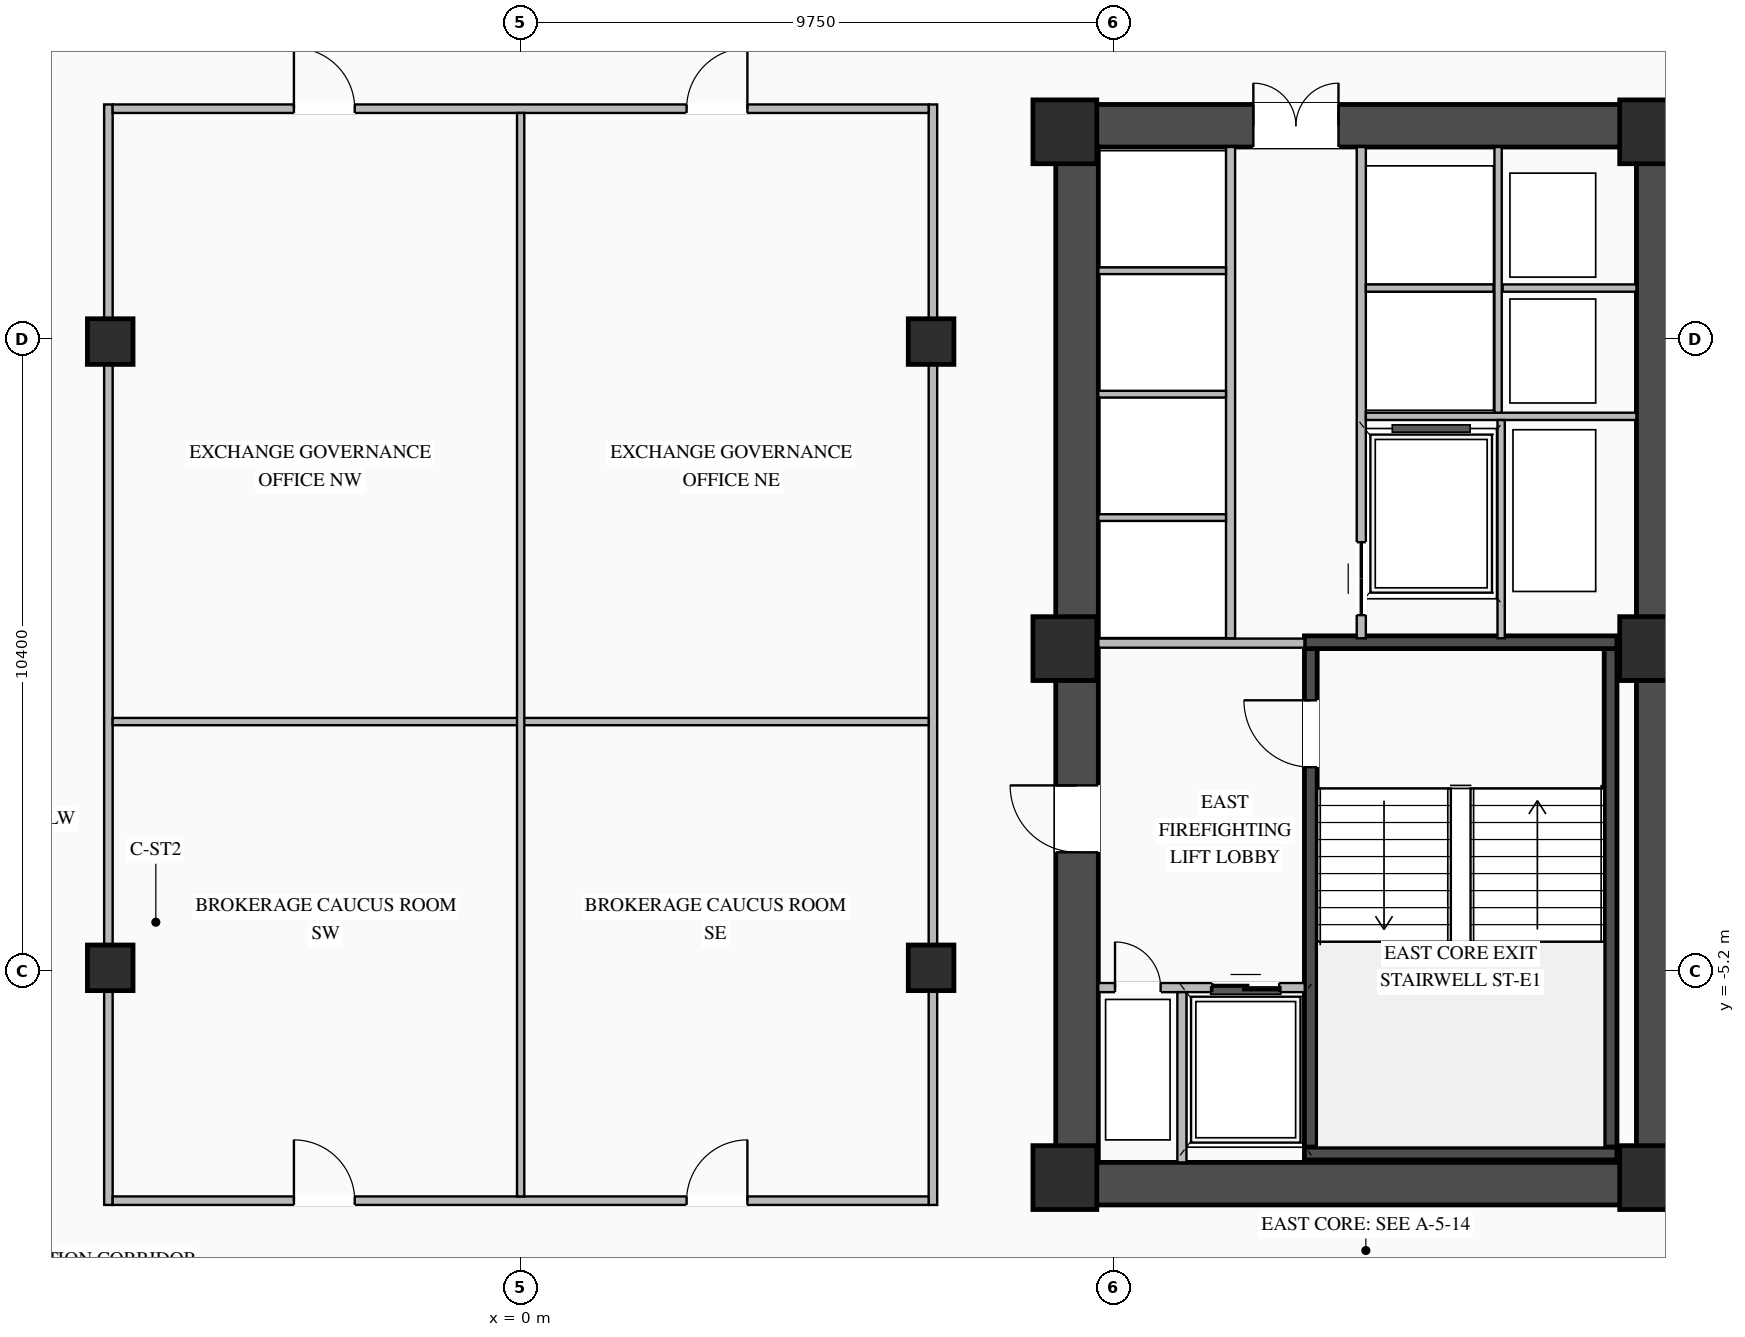
"""IFC4 building model, lengths in metres.
Left out: names, types, materials, properties, quantities, classifications, styles, units other than length and angle.
Written with IfcOpenShell. Run it as: python <this file> out.ifc"""

import sys

from ifc_helpers import new_model, si_unit, direction, frame, frame_2d, origin, origin_2d, place, context, subcontext, project, spatial, rectangle, i_section, extrude, element, fill, save


model = new_model("IFC4")
c1 = context("Model", 3, precision=1e-05, world=origin(), true_north=direction((0.0, 1.0)))
c2 = subcontext(c1, "Body", "Model", "MODEL_VIEW")
j1 = project(units=[si_unit("LENGTHUNIT", "METRE"), si_unit("PLANEANGLEUNIT", "RADIAN")], contexts=[c1])
p1 = place(None, origin())
s1 = spatial("IfcSite", under=j1, at=p1, CompositionType="ELEMENT")
p2 = place(p1, origin())
s2 = spatial("IfcBuilding", under=s1, at=p2, CompositionType="ELEMENT")
p3 = place(p2, frame((0.0, 0.0, 101.8)))
s3 = spatial("IfcBuildingStorey", under=s2, at=p3, CompositionType="ELEMENT", Elevation=101.8)
p4 = place(p3, frame((8.8, -8.7, 0.0), z_axis=(0.0, 0.0, 1.0), x_axis=(1.0, 0.0, 0.0)))
e1 = element("IfcWall", 1, at=p4, inside=s3, PredefinedType="SHEAR", context=c2, shape_type="SweptSolid", body=[
    extrude(rectangle(XDim=10.25, YDim=0.7, at=frame_2d((5.125, 0.0))), origin(), (0.0, 0.0, 1.0), 3.27),
])
p5 = place(p3, frame((8.8, 8.7, 0.0), z_axis=(0.0, 0.0, 1.0), x_axis=(1.0, 0.0, 0.0)))
e2 = element("IfcWall", 2, at=p5, inside=s3, PredefinedType="SHEAR", context=c2, shape_type="SweptSolid", body=[
    extrude(rectangle(XDim=10.25, YDim=0.7, at=frame_2d((5.125, 0.0))), origin(), (0.0, 0.0, 1.0), 3.27),
])
p6 = place(p5, frame((3.25, 0.0, 0.0)))
e3 = element("IfcOpeningElement", 3, at=p6, cuts=e2, PredefinedType="OPENING", context=c2, shape_type="SweptSolid", body=[
    extrude(rectangle(XDim=1.4, YDim=2.05, at=frame_2d((0.7, 1.025))), frame((0.0, 0.36, 0.0), z_axis=(0.0, -1.0, 0.0), x_axis=(1.0, 0.0, 0.0)), (0.0, 0.0, 1.0), 0.72),
])
p7 = place(p3, frame((9.15, -8.35, 0.0), z_axis=(0.0, 0.0, 1.0), x_axis=(0.0, 1.0, 0.0)))
e4 = element("IfcWall", 4, at=p7, inside=s3, PredefinedType="SHEAR", context=c2, shape_type="SweptSolid", body=[
    extrude(rectangle(XDim=16.7, YDim=0.7, at=frame_2d((8.35, 0.0))), origin(), (0.0, 0.0, 1.0), 3.27),
])
p8 = place(p7, frame((5.1, 0.0, 0.0)))
e5 = element("IfcOpeningElement", 5, at=p8, cuts=e4, PredefinedType="OPENING", context=c2, shape_type="SweptSolid", body=[
    extrude(rectangle(XDim=1.1, YDim=2.08, at=frame_2d((0.55, 1.04))), frame((0.0, 0.36, 0.0), z_axis=(0.0, -1.0, 0.0), x_axis=(1.0, 0.0, 0.0)), (0.0, 0.0, 1.0), 0.72),
])
p9 = place(p3, frame((18.7, -8.35, 0.0), z_axis=(0.0, 0.0, 1.0), x_axis=(0.0, 1.0, 0.0)))
e6 = element("IfcWall", 6, at=p9, inside=s3, PredefinedType="SHEAR", context=c2, shape_type="SweptSolid", body=[
    extrude(rectangle(XDim=16.7, YDim=0.7, at=frame_2d((8.35, 0.0))), origin(), (0.0, 0.0, 1.0), 3.27),
])
p10 = place(p3, frame((12.995, -8.1, 0.0), z_axis=(0.0, 0.0, 1.0), x_axis=(0.0, 1.0, 0.0)))
e7 = element("IfcWall", 7, at=p10, inside=s3, PredefinedType="SHEAR", context=c2, shape_type="SweptSolid", body=[
    extrude(rectangle(XDim=8.2, YDim=0.21, at=frame_2d((4.1, 0.0))), origin(), (0.0, 0.0, 1.0), 3.27),
])
p11 = place(p10, frame((6.25, 0.0, 0.0)))
e8 = element("IfcOpeningElement", 8, at=p11, cuts=e7, PredefinedType="OPENING", context=c2, shape_type="SweptSolid", body=[
    extrude(rectangle(XDim=1.1, YDim=2.15, at=frame_2d((0.55, 1.075))), frame((0.0, 0.115, 0.0), z_axis=(0.0, -1.0, 0.0), x_axis=(1.0, 0.0, 0.0)), (0.0, 0.0, 1.0), 0.23),
])
p12 = place(p3, frame((17.925, -8.1, 0.0), z_axis=(0.0, 0.0, 1.0), x_axis=(0.0, 1.0, 0.0)))
e9 = element("IfcWall", 9, at=p12, inside=s3, PredefinedType="SHEAR", context=c2, shape_type="SweptSolid", body=[
    extrude(rectangle(XDim=8.2, YDim=0.21, at=frame_2d((4.1, 0.0))), origin(), (0.0, 0.0, 1.0), 3.27),
])
for number, where, z_axis, x_axis in (
    (10, (12.89, -8.205, 0.0), (0.0, 0.0, 1.0), (1.0, 0.0, 0.0)),
    (11, (18.03, 0.205, 0.0), (0.0, 0.0, 1.0), (-1.0, 0.0, 0.0)),
):
    element("IfcWall", number, at=place(p3, frame(where, z_axis=z_axis, x_axis=x_axis)), inside=s3, PredefinedType="SHEAR", context=c2, shape_type="SweptSolid", body=[
        extrude(rectangle(XDim=5.14, YDim=0.21, at=frame_2d((2.57, 0.0))), origin(), (0.0, 0.0, 1.0), 3.27),
    ])
for number, where, z_axis, x_axis in (
    (12, (8.95, -8.6, 0.0), (0.0, 0.0, 1.0), (1.0, 0.0, 0.0)),
    (13, (8.95, 0.1, 0.0), (0.0, 0.0, 1.0), (1.0, 0.0, 0.0)),
    (14, (8.95, 8.6, 0.0), (0.0, 0.0, 1.0), (1.0, 0.0, 0.0)),
    (15, (18.6, -8.6, 0.0), (0.0, 0.0, 1.0), (1.0, 0.0, 0.0)),
    (16, (18.6, 0.1, 0.0), (0.0, 0.0, 1.0), (1.0, 0.0, 0.0)),
    (17, (18.6, 8.6, 0.0), (0.0, 0.0, 1.0), (1.0, 0.0, 0.0)),
):
    element("IfcColumn", number, at=place(p3, frame(where, z_axis=z_axis, x_axis=x_axis)), inside=s3, PredefinedType="COLUMN", context=c2, shape_type="SweptSolid", body=[
        extrude(rectangle(XDim=1.05, YDim=1.05, at=origin_2d()), origin(), (0.0, 0.0, 1.0), 3.45),
    ])
for number, where, z_axis, x_axis in (
    (18, (-6.75, -5.15, 0.0), (0.0, 0.0, 1.0), (1.0, 0.0, 0.0)),
    (19, (-6.75, 5.15, 0.0), (0.0, 0.0, 1.0), (1.0, 0.0, 0.0)),
    (20, (6.75, -5.15, 0.0), (0.0, 0.0, 1.0), (1.0, 0.0, 0.0)),
    (21, (6.75, 5.15, 0.0), (0.0, 0.0, 1.0), (1.0, 0.0, 0.0)),
):
    element("IfcColumn", number, at=place(p3, frame(where, z_axis=z_axis, x_axis=x_axis)), inside=s3, PredefinedType="COLUMN", context=c2, shape_type="SweptSolid", body=[
        extrude(i_section(OverallWidth=0.75, OverallDepth=0.75, WebThickness=0.03, FlangeThickness=0.044, at=origin_2d()), origin(), (0.0, 0.0, 1.0), 3.45),
    ])
p13 = place(p3, frame((9.5, -5.475, 0.0), z_axis=(0.0, 0.0, 1.0), x_axis=(1.0, 0.0, 0.0)))
e22 = element("IfcWall", 22, at=p13, inside=s3, PredefinedType="STANDARD", context=c2, shape_type="SweptSolid", body=[
    extrude(rectangle(XDim=3.395, YDim=0.15, at=frame_2d((1.698, 0.0))), origin(), (0.0, 0.0, 1.0), 3.25),
])
p14 = place(p13, frame((1.875, 0.0, 0.0)))
e23 = element("IfcOpeningElement", 23, at=p14, cuts=e22, PredefinedType="OPENING", context=c2, shape_type="SweptSolid", body=[
    extrude(rectangle(XDim=1.1, YDim=2.15, at=frame_2d((0.55, 1.075))), frame((0.0, 0.085, 0.0), z_axis=(0.0, -1.0, 0.0), x_axis=(1.0, 0.0, 0.0)), (0.0, 0.0, 1.0), 0.17),
])
p15 = place(p13, frame((0.275, 0.0, 0.0)))
e24 = element("IfcOpeningElement", 24, at=p15, cuts=e22, PredefinedType="OPENING", context=c2, shape_type="SweptSolid", body=[
    extrude(rectangle(XDim=0.75, YDim=2.05, at=frame_2d((0.375, 1.025))), frame((0.0, 0.085, 0.0), z_axis=(0.0, -1.0, 0.0), x_axis=(1.0, 0.0, 0.0)), (0.0, 0.0, 1.0), 0.17),
])
p16 = place(p3, frame((10.875, -8.35, 0.0), z_axis=(0.0, 0.0, 1.0), x_axis=(0.0, 1.0, 0.0)))
e25 = element("IfcWall", 25, at=p16, inside=s3, PredefinedType="STANDARD", context=c2, shape_type="SweptSolid", body=[
    extrude(rectangle(XDim=2.8, YDim=0.15, at=frame_2d((1.4, 0.0))), origin(), (0.0, 0.0, 1.0), 3.25),
])
p17 = place(p3, frame((9.5, 0.19, 0.0), z_axis=(0.0, 0.0, 1.0), x_axis=(1.0, 0.0, 0.0)))
e26 = element("IfcWall", 26, at=p17, inside=s3, PredefinedType="STANDARD", context=c2, shape_type="SweptSolid", body=[
    extrude(rectangle(XDim=3.39, YDim=0.15, at=frame_2d((1.695, 0.0))), origin(), (0.0, 0.0, 1.0), 2.645),
])
p18 = place(p3, frame((11.675, 0.27, 0.0), z_axis=(0.0, 0.0, 1.0), x_axis=(0.0, 1.0, 0.0)))
e27 = element("IfcWall", 27, at=p18, inside=s3, PredefinedType="STANDARD", context=c2, shape_type="SweptSolid", body=[
    extrude(rectangle(XDim=8.08, YDim=0.15, at=frame_2d((4.04, 0.0))), origin(), (0.0, 0.0, 1.0), 3.25),
])
for number, where, z_axis, x_axis in (
    (28, (9.5, 2.255, 0.0), (0.0, 0.0, 1.0), (1.0, 0.0, 0.0)),
    (29, (9.5, 4.285, 0.0), (0.0, 0.0, 1.0), (1.0, 0.0, 0.0)),
    (30, (9.5, 6.315, 0.0), (0.0, 0.0, 1.0), (1.0, 0.0, 0.0)),
):
    element("IfcWall", number, at=place(p3, frame(where, z_axis=z_axis, x_axis=x_axis)), inside=s3, PredefinedType="STANDARD", context=c2, shape_type="SweptSolid", body=[
        extrude(rectangle(XDim=2.1, YDim=0.11, at=frame_2d((1.05, 0.0))), origin(), (0.0, 0.0, 1.0), 3.25),
    ])
p19 = place(p3, frame((13.825, 0.27, 0.0), z_axis=(0.0, 0.0, 1.0), x_axis=(0.0, 1.0, 0.0)))
e31 = element("IfcWall", 31, at=p19, inside=s3, PredefinedType="STANDARD", context=c2, shape_type="SweptSolid", body=[
    extrude(rectangle(XDim=8.08, YDim=0.15, at=frame_2d((4.04, 0.0))), origin(), (0.0, 0.0, 1.0), 3.25),
])
p20 = place(p19, frame((0.38, 0.0, 0.0)))
e32 = element("IfcOpeningElement", 32, at=p20, cuts=e31, PredefinedType="OPENING", context=c2, shape_type="SweptSolid", body=[
    extrude(rectangle(XDim=1.2, YDim=2.1, at=frame_2d((0.6, 1.05))), frame((0.0, 0.085, 0.0), z_axis=(0.0, -1.0, 0.0), x_axis=(1.0, 0.0, 0.0)), (0.0, 0.0, 1.0), 0.17),
])
p21 = place(p3, frame((13.9, 3.92, 0.0), z_axis=(0.0, 0.0, 1.0), x_axis=(1.0, 0.0, 0.0)))
e33 = element("IfcWall", 33, at=p21, inside=s3, PredefinedType="STANDARD", context=c2, shape_type="SweptSolid", body=[
    extrude(rectangle(XDim=4.45, YDim=0.12, at=frame_2d((2.225, 0.0))), origin(), (0.0, 0.0, 1.0), 3.25),
])
p22 = place(p3, frame((16.15, 6.03, 0.0), z_axis=(0.0, 0.0, 1.0), x_axis=(1.0, 0.0, 0.0)))
e34 = element("IfcWall", 34, at=p22, inside=s3, PredefinedType="STANDARD", context=c2, shape_type="SweptSolid", body=[
    extrude(rectangle(XDim=2.2, YDim=0.12, at=frame_2d((1.1, 0.0))), origin(), (0.0, 0.0, 1.0), 3.25),
])
p23 = place(p3, frame((16.075, 3.98, 0.0), z_axis=(0.0, 0.0, 1.0), x_axis=(0.0, 1.0, 0.0)))
e35 = element("IfcWall", 35, at=p23, inside=s3, PredefinedType="STANDARD", context=c2, shape_type="SweptSolid", body=[
    extrude(rectangle(XDim=4.37, YDim=0.12, at=frame_2d((2.185, 0.0))), origin(), (0.0, 0.0, 1.0), 3.25),
])
p24 = place(p3, frame((13.9, 6.03, 0.0), z_axis=(0.0, 0.0, 1.0), x_axis=(1.0, 0.0, 0.0)))
e36 = element("IfcWall", 36, at=p24, inside=s3, PredefinedType="STANDARD", context=c2, shape_type="SweptSolid", body=[
    extrude(rectangle(XDim=2.1, YDim=0.12, at=frame_2d((1.05, 0.0))), origin(), (0.0, 0.0, 1.0), 3.25),
])
p25 = place(p3, frame((16.125, 0.27, 0.0), z_axis=(0.0, 0.0, 1.0), x_axis=(0.0, 1.0, 0.0)))
e37 = element("IfcWall", 37, at=p25, inside=s3, PredefinedType="STANDARD", context=c2, shape_type="SweptSolid", body=[
    extrude(rectangle(XDim=3.59, YDim=0.12, at=frame_2d((1.795, 0.0))), origin(), (0.0, 0.0, 1.0), 3.25),
])
for number, where, z_axis, x_axis in (
    (38, (-6.78, -9.05, 0.0), (0.0, 0.0, 1.0), (0.0, 1.0, 0.0)),
    (39, (6.78, -9.05, 0.0), (0.0, 0.0, 1.0), (0.0, 1.0, 0.0)),
):
    element("IfcWall", number, at=place(p3, frame(where, z_axis=z_axis, x_axis=x_axis)), inside=s3, PredefinedType="STANDARD", context=c2, shape_type="SweptSolid", body=[
        extrude(rectangle(XDim=18.1, YDim=0.14, at=frame_2d((9.05, 0.0))), origin(), (0.0, 0.0, 1.0), 2.645),
    ])
p26 = place(p3, frame((-6.71, -8.98, 0.0), z_axis=(0.0, 0.0, 1.0), x_axis=(1.0, 0.0, 0.0)))
e40 = element("IfcWall", 40, at=p26, inside=s3, PredefinedType="STANDARD", context=c2, shape_type="SweptSolid", body=[
    extrude(rectangle(XDim=13.42, YDim=0.14, at=frame_2d((6.71, 0.0))), origin(), (0.0, 0.0, 1.0), 3.25),
])
p27 = place(p26, frame((2.981, 0.0, 0.0)))
e41 = element("IfcOpeningElement", 41, at=p27, cuts=e40, PredefinedType="OPENING", context=c2, shape_type="SweptSolid", body=[
    extrude(rectangle(XDim=1.0, YDim=2.08, at=frame_2d((0.5, 1.04))), frame((0.0, 0.08, 0.0), z_axis=(0.0, -1.0, 0.0), x_axis=(1.0, 0.0, 0.0)), (0.0, 0.0, 1.0), 0.16),
])
p28 = place(p26, frame((9.439, 0.0, 0.0)))
e42 = element("IfcOpeningElement", 42, at=p28, cuts=e40, PredefinedType="OPENING", context=c2, shape_type="SweptSolid", body=[
    extrude(rectangle(XDim=1.0, YDim=2.08, at=frame_2d((0.5, 1.04))), frame((0.0, 0.08, 0.0), z_axis=(0.0, -1.0, 0.0), x_axis=(1.0, 0.0, 0.0)), (0.0, 0.0, 1.0), 0.16),
])
p29 = place(p3, frame((-6.71, 8.98, 0.0), z_axis=(0.0, 0.0, 1.0), x_axis=(1.0, 0.0, 0.0)))
e43 = element("IfcWall", 43, at=p29, inside=s3, PredefinedType="STANDARD", context=c2, shape_type="SweptSolid", body=[
    extrude(rectangle(XDim=13.42, YDim=0.14, at=frame_2d((6.71, 0.0))), origin(), (0.0, 0.0, 1.0), 3.25),
])
p30 = place(p29, frame((2.981, 0.0, 0.0)))
e44 = element("IfcOpeningElement", 44, at=p30, cuts=e43, PredefinedType="OPENING", context=c2, shape_type="SweptSolid", body=[
    extrude(rectangle(XDim=1.0, YDim=2.08, at=frame_2d((0.5, 1.04))), frame((0.0, 0.08, 0.0), z_axis=(0.0, -1.0, 0.0), x_axis=(1.0, 0.0, 0.0)), (0.0, 0.0, 1.0), 0.16),
])
p31 = place(p29, frame((9.439, 0.0, 0.0)))
e45 = element("IfcOpeningElement", 45, at=p31, cuts=e43, PredefinedType="OPENING", context=c2, shape_type="SweptSolid", body=[
    extrude(rectangle(XDim=1.0, YDim=2.08, at=frame_2d((0.5, 1.04))), frame((0.0, 0.08, 0.0), z_axis=(0.0, -1.0, 0.0), x_axis=(1.0, 0.0, 0.0)), (0.0, 0.0, 1.0), 0.16),
])
p32 = place(p3, frame((-6.71, -1.1, 0.0), z_axis=(0.0, 0.0, 1.0), x_axis=(1.0, 0.0, 0.0)))
e46 = element("IfcWall", 46, at=p32, inside=s3, PredefinedType="STANDARD", context=c2, shape_type="SweptSolid", body=[
    extrude(rectangle(XDim=13.42, YDim=0.12, at=frame_2d((6.71, 0.0))), origin(), (0.0, 0.0, 1.0), 3.25),
])
p33 = place(p3, frame((0.0, -8.91, 0.0), z_axis=(0.0, 0.0, 1.0), x_axis=(0.0, 1.0, 0.0)))
e47 = element("IfcWall", 47, at=p33, inside=s3, PredefinedType="STANDARD", context=c2, shape_type="SweptSolid", body=[
    extrude(rectangle(XDim=17.82, YDim=0.12, at=frame_2d((8.91, 0.0))), origin(), (0.0, 0.0, 1.0), 3.25),
])
p34 = place(p11, origin())
e48 = element("IfcDoor", 48, at=p34, inside=s3, OperationType="SINGLE_SWING_RIGHT", PredefinedType="DOOR", context=c2, shape_type="SweptSolid", body=[
    extrude(rectangle(XDim=1.1, YDim=2.15, at=frame_2d((0.55, 1.075))), frame((0.0, 0.025, 0.0), z_axis=(0.0, -1.0, 0.0), x_axis=(1.0, 0.0, 0.0)), (0.0, 0.0, 1.0), 0.05),
])
fill(e8, e48)
p35 = place(p14, origin())
e49 = element("IfcDoor", 49, at=p35, inside=s3, OperationType="DOUBLE_DOOR_SLIDING", PredefinedType="DOOR", context=c2, shape_type="SweptSolid", body=[
    extrude(rectangle(XDim=1.1, YDim=2.15, at=frame_2d((0.55, 1.075))), frame((0.0, 0.025, 0.0), z_axis=(0.0, -1.0, 0.0), x_axis=(1.0, 0.0, 0.0)), (0.0, 0.0, 1.0), 0.05),
])
fill(e23, e49)
p36 = place(p15, origin())
e50 = element("IfcDoor", 50, at=p36, inside=s3, OperationType="SINGLE_SWING_LEFT", PredefinedType="DOOR", context=c2, shape_type="SweptSolid", body=[
    extrude(rectangle(XDim=0.75, YDim=2.05, at=frame_2d((0.375, 1.025))), frame((0.0, 0.025, 0.0), z_axis=(0.0, -1.0, 0.0), x_axis=(1.0, 0.0, 0.0)), (0.0, 0.0, 1.0), 0.05),
])
fill(e24, e50)
p37 = place(p8, origin())
e51 = element("IfcDoor", 51, at=p37, inside=s3, OperationType="SINGLE_SWING_RIGHT", PredefinedType="DOOR", context=c2, shape_type="SweptSolid", body=[
    extrude(rectangle(XDim=1.1, YDim=2.08, at=frame_2d((0.55, 1.04))), frame((0.0, -0.255, 0.0), z_axis=(0.0, -1.0, 0.0), x_axis=(1.0, 0.0, 0.0)), (0.0, 0.0, 1.0), 0.05),
])
fill(e5, e51)
p38 = place(p6, origin())
e52 = element("IfcDoor", 52, at=p38, inside=s3, OperationType="DOUBLE_DOOR_SINGLE_SWING", PredefinedType="DOOR", context=c2, shape_type="SweptSolid", body=[
    extrude(rectangle(XDim=1.4, YDim=2.05, at=frame_2d((0.7, 1.025))), frame((0.0, 0.295, 0.0), z_axis=(0.0, -1.0, 0.0), x_axis=(1.0, 0.0, 0.0)), (0.0, 0.0, 1.0), 0.05),
])
fill(e3, e52)
p39 = place(p20, origin())
e53 = element("IfcDoor", 53, at=p39, inside=s3, OperationType="DOUBLE_DOOR_SLIDING", PredefinedType="DOOR", context=c2, shape_type="SweptSolid", body=[
    extrude(rectangle(XDim=1.2, YDim=2.1, at=frame_2d((0.6, 1.05))), frame((0.0, 0.025, 0.0), z_axis=(0.0, -1.0, 0.0), x_axis=(1.0, 0.0, 0.0)), (0.0, 0.0, 1.0), 0.05),
])
fill(e32, e53)
p40 = place(p27, origin())
e54 = element("IfcDoor", 54, at=p40, inside=s3, OperationType="SINGLE_SWING_LEFT", PredefinedType="DOOR", context=c2, shape_type="SweptSolid", body=[
    extrude(rectangle(XDim=1.0, YDim=2.08, at=frame_2d((0.5, 1.04))), frame((0.0, 0.025, 0.0), z_axis=(0.0, -1.0, 0.0), x_axis=(1.0, 0.0, 0.0)), (0.0, 0.0, 1.0), 0.05),
])
fill(e41, e54)
p41 = place(p28, origin())
e55 = element("IfcDoor", 55, at=p41, inside=s3, OperationType="SINGLE_SWING_RIGHT", PredefinedType="DOOR", context=c2, shape_type="SweptSolid", body=[
    extrude(rectangle(XDim=1.0, YDim=2.08, at=frame_2d((0.5, 1.04))), frame((0.0, 0.025, 0.0), z_axis=(0.0, -1.0, 0.0), x_axis=(1.0, 0.0, 0.0)), (0.0, 0.0, 1.0), 0.05),
])
fill(e42, e55)
p42 = place(p30, origin())
e56 = element("IfcDoor", 56, at=p42, inside=s3, OperationType="SINGLE_SWING_LEFT", PredefinedType="DOOR", context=c2, shape_type="SweptSolid", body=[
    extrude(rectangle(XDim=1.0, YDim=2.08, at=frame_2d((0.5, 1.04))), frame((0.0, 0.025, 0.0), z_axis=(0.0, -1.0, 0.0), x_axis=(1.0, 0.0, 0.0)), (0.0, 0.0, 1.0), 0.05),
])
fill(e44, e56)
p43 = place(p31, origin())
e57 = element("IfcDoor", 57, at=p43, inside=s3, OperationType="SINGLE_SWING_RIGHT", PredefinedType="DOOR", context=c2, shape_type="SweptSolid", body=[
    extrude(rectangle(XDim=1.0, YDim=2.08, at=frame_2d((0.5, 1.04))), frame((0.0, 0.025, 0.0), z_axis=(0.0, -1.0, 0.0), x_axis=(1.0, 0.0, 0.0)), (0.0, 0.0, 1.0), 0.05),
])
fill(e45, e57)
save(model, sys.argv[1])
